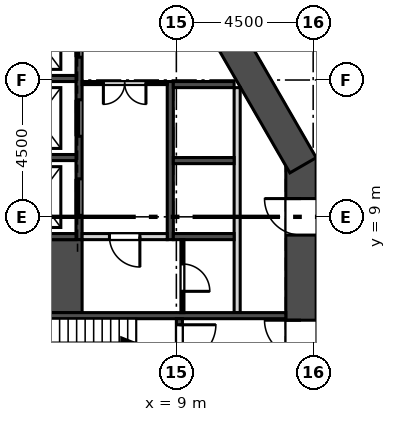
"""IFC4 building model, lengths in metres.
Left out: names, types, materials, properties, quantities, classifications, styles, units other than length and angle.
Written with IfcOpenShell. Run it as: python <this file> out.ifc"""

import sys

from ifc_helpers import new_model, si_unit, direction, frame, frame_2d, origin, place, context, subcontext, project, spatial, rectangle, extrude, element, fill, save


model = new_model("IFC4")
c1 = context("Model", 3, precision=1e-05, world=origin(), true_north=direction((0.0, 1.0)))
c2 = subcontext(c1, "Body", "Model", "MODEL_VIEW")
j1 = project(units=[si_unit("LENGTHUNIT", "METRE"), si_unit("PLANEANGLEUNIT", "RADIAN")], contexts=[c1])
p1 = place(None, origin())
s1 = spatial("IfcSite", under=j1, at=p1, CompositionType="ELEMENT")
p2 = place(p1, origin())
s2 = spatial("IfcBuilding", under=s1, at=p2, CompositionType="ELEMENT")
p3 = place(p2, frame((0.0, 0.0, 218.1)))
s3 = spatial("IfcBuildingStorey", under=s2, at=p3, CompositionType="ELEMENT", Elevation=218.1)
p4 = place(p3, frame((13.1, 1.25, 0.0), z_axis=(0.0, 0.0, 1.0), x_axis=(0.0, 1.0, 0.0)))
e1 = element("IfcWall", 1, at=p4, inside=s3, PredefinedType="SHEAR", context=c2, shape_type="SweptSolid", body=[
    extrude(rectangle(XDim=9.695, YDim=1.0, at=frame_2d((4.848, 0.0))), origin(), (0.0, 0.0, 1.0), 5.4),
])
p5 = place(p4, frame((3.15, 0.0, 0.0)))
e2 = element("IfcOpeningElement", 2, at=p5, cuts=e1, PredefinedType="OPENING", context=c2, shape_type="SweptSolid", body=[
    extrude(rectangle(XDim=1.2, YDim=2.1, at=frame_2d((0.6, 1.05))), frame((0.0, 0.51, 0.0), z_axis=(0.0, -1.0, 0.0), x_axis=(1.0, 0.0, 0.0)), (0.0, 0.0, 1.0), 1.02),
])
p6 = place(p4, frame((7.15, 0.0, 0.0)))
e3 = element("IfcOpeningElement", 3, at=p6, cuts=e1, PredefinedType="OPENING", context=c2, shape_type="SweptSolid", body=[
    extrude(rectangle(XDim=1.2, YDim=2.1, at=frame_2d((0.6, 1.05))), frame((0.0, 0.51, 0.0), z_axis=(0.0, -1.0, 0.0), x_axis=(1.0, 0.0, 0.0)), (0.0, 0.0, 1.0), 1.02),
])
p7 = place(p3, frame((13.167, 10.695, 0.0), z_axis=(0.0, 0.0, 1.0), x_axis=(-0.499995021168, 0.866028278295, 0.0)))
e4 = element("IfcWall", 4, at=p7, inside=s3, PredefinedType="SHEAR", context=c2, shape_type="SweptSolid", body=[
    extrude(rectangle(XDim=8.839, YDim=1.0, at=frame_2d((4.419, 0.0))), origin(), (0.0, 0.0, 1.0), 5.4),
])
p8 = place(p3, frame((27.139, 7.709, 0.0), z_axis=(0.0, 0.0, 1.0), x_axis=(-0.500000533701, 0.866025095652, 0.0)))
e5 = element("IfcWall", 5, at=p8, inside=s3, PredefinedType="SOLIDWALL", context=c2, shape_type="SweptSolid", body=[
    extrude(rectangle(XDim=45.573, YDim=0.34, at=frame_2d((22.787, 0.0))), origin(), (0.0, 0.0, 1.0), 5.0),
])
p9 = place(p8, frame((1.893, 0.0, 0.9)))
e6 = element("IfcOpeningElement", 6, at=p9, cuts=e5, PredefinedType="OPENING", context=c2, shape_type="SweptSolid", body=[
    extrude(rectangle(XDim=1.885, YDim=3.0, at=frame_2d((0.942, 1.5))), frame((0.0, 0.18, 0.0), z_axis=(0.0, -1.0, 0.0), x_axis=(1.0, 0.0, 0.0)), (0.0, 0.0, 1.0), 0.36),
])
p10 = place(p8, frame((4.893, 0.0, 0.9)))
e7 = element("IfcOpeningElement", 7, at=p10, cuts=e5, PredefinedType="OPENING", context=c2, shape_type="SweptSolid", body=[
    extrude(rectangle(XDim=1.885, YDim=3.0, at=frame_2d((0.942, 1.5))), frame((0.0, 0.18, 0.0), z_axis=(0.0, -1.0, 0.0), x_axis=(1.0, 0.0, 0.0)), (0.0, 0.0, 1.0), 0.36),
])
p11 = place(p8, frame((7.893, 0.0, 0.9)))
e8 = element("IfcOpeningElement", 8, at=p11, cuts=e5, PredefinedType="OPENING", context=c2, shape_type="SweptSolid", body=[
    extrude(rectangle(XDim=1.885, YDim=3.0, at=frame_2d((0.942, 1.5))), frame((0.0, 0.18, 0.0), z_axis=(0.0, -1.0, 0.0), x_axis=(1.0, 0.0, 0.0)), (0.0, 0.0, 1.0), 0.36),
])
p12 = place(p8, frame((10.893, 0.0, 0.9)))
e9 = element("IfcOpeningElement", 9, at=p12, cuts=e5, PredefinedType="OPENING", context=c2, shape_type="SweptSolid", body=[
    extrude(rectangle(XDim=1.885, YDim=3.0, at=frame_2d((0.942, 1.5))), frame((0.0, 0.18, 0.0), z_axis=(0.0, -1.0, 0.0), x_axis=(1.0, 0.0, 0.0)), (0.0, 0.0, 1.0), 0.36),
])
p13 = place(p8, frame((13.893, 0.0, 0.9)))
e10 = element("IfcOpeningElement", 10, at=p13, cuts=e5, PredefinedType="OPENING", context=c2, shape_type="SweptSolid", body=[
    extrude(rectangle(XDim=1.885, YDim=3.0, at=frame_2d((0.942, 1.5))), frame((0.0, 0.18, 0.0), z_axis=(0.0, -1.0, 0.0), x_axis=(1.0, 0.0, 0.0)), (0.0, 0.0, 1.0), 0.36),
])
p14 = place(p8, frame((16.893, 0.0, 0.9)))
e11 = element("IfcOpeningElement", 11, at=p14, cuts=e5, PredefinedType="OPENING", context=c2, shape_type="SweptSolid", body=[
    extrude(rectangle(XDim=1.885, YDim=3.0, at=frame_2d((0.942, 1.5))), frame((0.0, 0.18, 0.0), z_axis=(0.0, -1.0, 0.0), x_axis=(1.0, 0.0, 0.0)), (0.0, 0.0, 1.0), 0.36),
])
p15 = place(p8, frame((19.893, 0.0, 0.9)))
e12 = element("IfcOpeningElement", 12, at=p15, cuts=e5, PredefinedType="OPENING", context=c2, shape_type="SweptSolid", body=[
    extrude(rectangle(XDim=1.885, YDim=3.0, at=frame_2d((0.942, 1.5))), frame((0.0, 0.18, 0.0), z_axis=(0.0, -1.0, 0.0), x_axis=(1.0, 0.0, 0.0)), (0.0, 0.0, 1.0), 0.36),
])
p16 = place(p8, frame((22.893, 0.0, 0.9)))
e13 = element("IfcOpeningElement", 13, at=p16, cuts=e5, PredefinedType="OPENING", context=c2, shape_type="SweptSolid", body=[
    extrude(rectangle(XDim=1.885, YDim=3.0, at=frame_2d((0.942, 1.5))), frame((0.0, 0.18, 0.0), z_axis=(0.0, -1.0, 0.0), x_axis=(1.0, 0.0, 0.0)), (0.0, 0.0, 1.0), 0.36),
])
p17 = place(p8, frame((25.893, 0.0, 0.9)))
e14 = element("IfcOpeningElement", 14, at=p17, cuts=e5, PredefinedType="OPENING", context=c2, shape_type="SweptSolid", body=[
    extrude(rectangle(XDim=1.885, YDim=3.0, at=frame_2d((0.942, 1.5))), frame((0.0, 0.18, 0.0), z_axis=(0.0, -1.0, 0.0), x_axis=(1.0, 0.0, 0.0)), (0.0, 0.0, 1.0), 0.36),
])
p18 = place(p8, frame((28.893, 0.0, 0.9)))
e15 = element("IfcOpeningElement", 15, at=p18, cuts=e5, PredefinedType="OPENING", context=c2, shape_type="SweptSolid", body=[
    extrude(rectangle(XDim=1.885, YDim=3.0, at=frame_2d((0.942, 1.5))), frame((0.0, 0.18, 0.0), z_axis=(0.0, -1.0, 0.0), x_axis=(1.0, 0.0, 0.0)), (0.0, 0.0, 1.0), 0.36),
])
p19 = place(p8, frame((31.893, 0.0, 0.9)))
e16 = element("IfcOpeningElement", 16, at=p19, cuts=e5, PredefinedType="OPENING", context=c2, shape_type="SweptSolid", body=[
    extrude(rectangle(XDim=1.885, YDim=3.0, at=frame_2d((0.942, 1.5))), frame((0.0, 0.18, 0.0), z_axis=(0.0, -1.0, 0.0), x_axis=(1.0, 0.0, 0.0)), (0.0, 0.0, 1.0), 0.36),
])
p20 = place(p8, frame((34.893, 0.0, 0.9)))
e17 = element("IfcOpeningElement", 17, at=p20, cuts=e5, PredefinedType="OPENING", context=c2, shape_type="SweptSolid", body=[
    extrude(rectangle(XDim=1.885, YDim=3.0, at=frame_2d((0.942, 1.5))), frame((0.0, 0.18, 0.0), z_axis=(0.0, -1.0, 0.0), x_axis=(1.0, 0.0, 0.0)), (0.0, 0.0, 1.0), 0.36),
])
p21 = place(p8, frame((37.893, 0.0, 0.9)))
e18 = element("IfcOpeningElement", 18, at=p21, cuts=e5, PredefinedType="OPENING", context=c2, shape_type="SweptSolid", body=[
    extrude(rectangle(XDim=1.885, YDim=3.0, at=frame_2d((0.942, 1.5))), frame((0.0, 0.18, 0.0), z_axis=(0.0, -1.0, 0.0), x_axis=(1.0, 0.0, 0.0)), (0.0, 0.0, 1.0), 0.36),
])
p22 = place(p8, frame((40.893, 0.0, 0.9)))
e19 = element("IfcOpeningElement", 19, at=p22, cuts=e5, PredefinedType="OPENING", context=c2, shape_type="SweptSolid", body=[
    extrude(rectangle(XDim=1.885, YDim=3.0, at=frame_2d((0.942, 1.5))), frame((0.0, 0.18, 0.0), z_axis=(0.0, -1.0, 0.0), x_axis=(1.0, 0.0, 0.0)), (0.0, 0.0, 1.0), 0.36),
])
p23 = place(p3, frame((11.0, 5.85, 0.0), z_axis=(0.0, 0.0, 1.0), x_axis=(0.0, 1.0, 0.0)))
e20 = element("IfcWall", 20, at=p23, inside=s3, PredefinedType="SOLIDWALL", context=c2, shape_type="SweptSolid", body=[
    extrude(rectangle(XDim=7.4, YDim=0.2, at=frame_2d((3.7, 0.0))), origin(), (0.0, 0.0, 1.0), 5.0),
])
p24 = place(p3, frame((8.8, 8.25, -0.4), z_axis=(0.0, 0.0, 1.0), x_axis=(0.0, 1.0, 0.0)))
e21 = element("IfcWall", 21, at=p24, inside=s3, PredefinedType="SOLIDWALL", context=c2, shape_type="SweptSolid", body=[
    extrude(rectangle(XDim=5.2, YDim=0.2, at=frame_2d((2.6, 0.0))), origin(), (0.0, 0.0, 1.0), 5.4),
])
p25 = place(p3, frame((5.8, 8.25, -0.4), z_axis=(0.0, 0.0, 1.0), x_axis=(0.0, 1.0, 0.0)))
e22 = element("IfcWall", 22, at=p25, inside=s3, PredefinedType="SOLIDWALL", context=c2, shape_type="SweptSolid", body=[
    extrude(rectangle(XDim=8.0, YDim=0.2, at=frame_2d((4.0, 0.0))), origin(), (0.0, 0.0, 1.0), 5.4),
])
p26 = place(p25, frame((0.8, 0.0, 0.4)))
e23 = element("IfcOpeningElement", 23, at=p26, cuts=e22, PredefinedType="OPENING", context=c2, shape_type="SweptSolid", body=[
    extrude(rectangle(XDim=1.2, YDim=2.1, at=frame_2d((0.6, 1.05))), frame((0.0, 0.11, 0.0), z_axis=(0.0, -1.0, 0.0), x_axis=(1.0, 0.0, 0.0)), (0.0, 0.0, 1.0), 0.22),
])
p27 = place(p25, frame((3.4, 0.0, 0.4)))
e24 = element("IfcOpeningElement", 24, at=p27, cuts=e22, PredefinedType="OPENING", context=c2, shape_type="SweptSolid", body=[
    extrude(rectangle(XDim=1.2, YDim=2.1, at=frame_2d((0.6, 1.05))), frame((0.0, 0.11, 0.0), z_axis=(0.0, -1.0, 0.0), x_axis=(1.0, 0.0, 0.0)), (0.0, 0.0, 1.0), 0.22),
])
p28 = place(p25, frame((6.0, 0.0, 0.4)))
e25 = element("IfcOpeningElement", 25, at=p28, cuts=e22, PredefinedType="OPENING", context=c2, shape_type="SweptSolid", body=[
    extrude(rectangle(XDim=1.2, YDim=2.1, at=frame_2d((0.6, 1.05))), frame((0.0, 0.11, 0.0), z_axis=(0.0, -1.0, 0.0), x_axis=(1.0, 0.0, 0.0)), (0.0, 0.0, 1.0), 0.22),
])
p29 = place(p3, frame((5.2, 5.85, -0.4), z_axis=(0.0, 0.0, 1.0), x_axis=(0.0, 1.0, 0.0)))
e26 = element("IfcWall", 26, at=p29, inside=s3, PredefinedType="SOLIDWALL", context=c2, shape_type="SweptSolid", body=[
    extrude(rectangle(XDim=2.4, YDim=1.4, at=frame_2d((1.2, 0.0))), origin(), (0.0, 0.0, 1.0), 5.4),
])
p30 = place(p3, frame((8.9, 8.35, -0.4), z_axis=(0.0, 0.0, 1.0), x_axis=(1.0, 0.0, 0.0)))
e27 = element("IfcWall", 27, at=p30, inside=s3, PredefinedType="SOLIDWALL", context=c2, shape_type="SweptSolid", body=[
    extrude(rectangle(XDim=2.0, YDim=0.2, at=frame_2d((1.0, 0.0))), origin(), (0.0, 0.0, 1.0), 5.4),
])
p31 = place(p3, frame((1.5, 8.35, -0.4), z_axis=(0.0, 0.0, 1.0), x_axis=(1.0, 0.0, 0.0)))
e28 = element("IfcWall", 28, at=p31, inside=s3, PredefinedType="SOLIDWALL", context=c2, shape_type="SweptSolid", body=[
    extrude(rectangle(XDim=4.2, YDim=0.2, at=frame_2d((2.1, 0.0))), origin(), (0.0, 0.0, 1.0), 5.4),
])
p32 = place(p3, frame((1.2, 5.75, -0.4), z_axis=(0.0, 0.0, 1.0), x_axis=(1.0, 0.0, 0.0)))
e29 = element("IfcWall", 29, at=p32, inside=s3, PredefinedType="SOLIDWALL", context=c2, shape_type="SweptSolid", body=[
    extrude(rectangle(XDim=11.4, YDim=0.2, at=frame_2d((5.7, 0.0))), origin(), (0.0, 0.0, 1.0), 5.4),
])
p33 = place(p3, frame((9.1, 2.25, -0.4), z_axis=(0.0, 0.0, 1.0), x_axis=(0.0, 1.0, 0.0)))
e30 = element("IfcWall", 30, at=p33, inside=s3, PredefinedType="SOLIDWALL", context=c2, shape_type="SweptSolid", body=[
    extrude(rectangle(XDim=3.4, YDim=0.2, at=frame_2d((1.7, 0.0))), origin(), (0.0, 0.0, 1.0), 5.4),
])
p34 = place(p33, frame((0.2, 0.0, 0.4)))
e31 = element("IfcOpeningElement", 31, at=p34, cuts=e30, PredefinedType="OPENING", context=c2, shape_type="SweptSolid", body=[
    extrude(rectangle(XDim=1.2, YDim=2.1, at=frame_2d((0.6, 1.05))), frame((0.0, 0.11, 0.0), z_axis=(0.0, -1.0, 0.0), x_axis=(1.0, 0.0, 0.0)), (0.0, 0.0, 1.0), 0.22),
])
p35 = place(p33, frame((2.0, 0.0, 0.4)))
e32 = element("IfcOpeningElement", 32, at=p35, cuts=e30, PredefinedType="OPENING", context=c2, shape_type="SweptSolid", body=[
    extrude(rectangle(XDim=1.2, YDim=2.1, at=frame_2d((0.6, 1.05))), frame((0.0, 0.11, 0.0), z_axis=(0.0, -1.0, 0.0), x_axis=(1.0, 0.0, 0.0)), (0.0, 0.0, 1.0), 0.22),
])
for number, where, z_axis, x_axis in (
    (33, (8.9, 10.85, -0.4), (0.0, 0.0, 1.0), (1.0, 0.0, 0.0)),
    (34, (8.9, 13.35, -0.4), (0.0, 0.0, 1.0), (1.0, 0.0, 0.0)),
    (35, (3.7, 10.95, -0.4), (0.0, 0.0, 1.0), (1.0, 0.0, 0.0)),
    (36, (3.7, 13.55, -0.4), (0.0, 0.0, 1.0), (1.0, 0.0, 0.0)),
):
    element("IfcWall", number, at=place(p3, frame(where, z_axis=z_axis, x_axis=x_axis)), inside=s3, PredefinedType="SOLIDWALL", context=c2, shape_type="SweptSolid", body=[
        extrude(rectangle(XDim=2.0, YDim=0.2, at=frame_2d((1.0, 0.0))), origin(), (0.0, 0.0, 1.0), 5.4),
    ])
p36 = place(p3, frame((5.9, 13.4, 0.0), z_axis=(0.0, 0.0, 1.0), x_axis=(1.0, 0.0, 0.0)))
e37 = element("IfcWall", 37, at=p36, inside=s3, PredefinedType="PARTITIONING", context=c2, shape_type="SweptSolid", body=[
    extrude(rectangle(XDim=2.8, YDim=0.1, at=frame_2d((1.4, 0.0))), origin(), (0.0, 0.0, 1.0), 5.0),
])
p37 = place(p36, frame((0.7, 0.0, 0.0)))
e38 = element("IfcOpeningElement", 38, at=p37, cuts=e37, PredefinedType="OPENING", context=c2, shape_type="SweptSolid", body=[
    extrude(rectangle(XDim=1.4, YDim=2.1, at=frame_2d((0.7, 1.05))), frame((0.0, 0.06, 0.0), z_axis=(0.0, -1.0, 0.0), x_axis=(1.0, 0.0, 0.0)), (0.0, 0.0, 1.0), 0.12),
])
p38 = place(p3, frame((9.2, 5.85, 0.0), z_axis=(0.0, 0.0, 1.0), x_axis=(0.0, 1.0, 0.0)))
e39 = element("IfcWall", 39, at=p38, inside=s3, PredefinedType="PARTITIONING", context=c2, shape_type="SweptSolid", body=[
    extrude(rectangle(XDim=2.4, YDim=0.1, at=frame_2d((1.2, 0.0))), origin(), (0.0, 0.0, 1.0), 5.0),
])
p39 = place(p38, frame((0.7, 0.0, 0.0)))
e40 = element("IfcOpeningElement", 40, at=p39, cuts=e39, PredefinedType="OPENING", context=c2, shape_type="SweptSolid", body=[
    extrude(rectangle(XDim=0.9, YDim=2.1, at=frame_2d((0.45, 1.05))), frame((0.0, 0.06, 0.0), z_axis=(0.0, -1.0, 0.0), x_axis=(1.0, 0.0, 0.0)), (0.0, 0.0, 1.0), 0.12),
])
p40 = place(p3, frame((5.9, 8.35, 0.0), z_axis=(0.0, 0.0, 1.0), x_axis=(1.0, 0.0, 0.0)))
e41 = element("IfcWall", 41, at=p40, inside=s3, PredefinedType="SOLIDWALL", context=c2, shape_type="SweptSolid", body=[
    extrude(rectangle(XDim=2.8, YDim=0.2, at=frame_2d((1.4, 0.0))), origin(), (0.0, 0.0, 1.0), 5.0),
])
p41 = place(p40, frame((0.9, 0.0, 0.0)))
e42 = element("IfcOpeningElement", 42, at=p41, cuts=e41, PredefinedType="OPENING", context=c2, shape_type="SweptSolid", body=[
    extrude(rectangle(XDim=1.0, YDim=2.1, at=frame_2d((0.5, 1.05))), frame((0.0, 0.11, 0.0), z_axis=(0.0, -1.0, 0.0), x_axis=(1.0, 0.0, 0.0)), (0.0, 0.0, 1.0), 0.22),
])
p42 = place(p3, frame((11.621, 22.474, 0.0), z_axis=(0.0, 0.0, 1.0), x_axis=(0.499991059272, -0.866030565655, 0.0)))
e43 = element("IfcWall", 43, at=p42, inside=s3, PredefinedType="SOLIDWALL", context=c2, shape_type="SweptSolid", body=[
    extrude(rectangle(XDim=11.854, YDim=0.3, at=frame_2d((5.927, 0.0))), origin(), (0.0, 0.0, 1.0), 5.0),
])
p43 = place(p26, origin())
e44 = element("IfcDoor", 44, at=p43, inside=s3, OperationType="SLIDING_TO_LEFT", PredefinedType="DOOR", context=c2, shape_type="SweptSolid", body=[
    extrude(rectangle(XDim=1.2, YDim=2.1, at=frame_2d((0.6, 1.05))), frame((0.0, 0.025, 0.0), z_axis=(0.0, -1.0, 0.0), x_axis=(1.0, 0.0, 0.0)), (0.0, 0.0, 1.0), 0.05),
])
fill(e23, e44)
p44 = place(p27, origin())
e45 = element("IfcDoor", 45, at=p44, inside=s3, OperationType="SLIDING_TO_LEFT", PredefinedType="DOOR", context=c2, shape_type="SweptSolid", body=[
    extrude(rectangle(XDim=1.2, YDim=2.1, at=frame_2d((0.6, 1.05))), frame((0.0, 0.025, 0.0), z_axis=(0.0, -1.0, 0.0), x_axis=(1.0, 0.0, 0.0)), (0.0, 0.0, 1.0), 0.05),
])
fill(e24, e45)
p45 = place(p28, origin())
e46 = element("IfcDoor", 46, at=p45, inside=s3, OperationType="SLIDING_TO_LEFT", PredefinedType="DOOR", context=c2, shape_type="SweptSolid", body=[
    extrude(rectangle(XDim=1.2, YDim=2.1, at=frame_2d((0.6, 1.05))), frame((0.0, 0.025, 0.0), z_axis=(0.0, -1.0, 0.0), x_axis=(1.0, 0.0, 0.0)), (0.0, 0.0, 1.0), 0.05),
])
fill(e25, e46)
p46 = place(p37, frame((1.4, 0.0, 0.0), z_axis=(0.0, 0.0, 1.0), x_axis=(-1.0, 0.0, 0.0)))
e47 = element("IfcDoor", 47, at=p46, inside=s3, OperationType="DOUBLE_DOOR_SINGLE_SWING", PredefinedType="DOOR", context=c2, shape_type="SweptSolid", body=[
    extrude(rectangle(XDim=1.4, YDim=2.1, at=frame_2d((0.7, 1.05))), frame((0.0, 0.025, 0.0), z_axis=(0.0, -1.0, 0.0), x_axis=(1.0, 0.0, 0.0)), (0.0, 0.0, 1.0), 0.05),
])
fill(e38, e47)
p47 = place(p41, frame((1.0, 0.0, 0.0), z_axis=(0.0, 0.0, 1.0), x_axis=(-1.0, 0.0, 0.0)))
e48 = element("IfcDoor", 48, at=p47, inside=s3, OperationType="SINGLE_SWING_LEFT", PredefinedType="DOOR", context=c2, shape_type="SweptSolid", body=[
    extrude(rectangle(XDim=1.0, YDim=2.1, at=frame_2d((0.5, 1.05))), frame((0.0, 0.025, 0.0), z_axis=(0.0, -1.0, 0.0), x_axis=(1.0, 0.0, 0.0)), (0.0, 0.0, 1.0), 0.05),
])
fill(e42, e48)
p48 = place(p39, frame((0.9, 0.0, 0.0), z_axis=(0.0, 0.0, 1.0), x_axis=(-1.0, 0.0, 0.0)))
e49 = element("IfcDoor", 49, at=p48, inside=s3, OperationType="SINGLE_SWING_RIGHT", PredefinedType="DOOR", context=c2, shape_type="SweptSolid", body=[
    extrude(rectangle(XDim=0.9, YDim=2.1, at=frame_2d((0.45, 1.05))), frame((0.0, 0.025, 0.0), z_axis=(0.0, -1.0, 0.0), x_axis=(1.0, 0.0, 0.0)), (0.0, 0.0, 1.0), 0.05),
])
fill(e40, e49)
p49 = place(p5, origin())
e50 = element("IfcDoor", 50, at=p49, inside=s3, OperationType="SINGLE_SWING_RIGHT", PredefinedType="DOOR", context=c2, shape_type="SweptSolid", body=[
    extrude(rectangle(XDim=1.2, YDim=2.1, at=frame_2d((0.6, 1.05))), frame((0.0, 0.025, 0.0), z_axis=(0.0, -1.0, 0.0), x_axis=(1.0, 0.0, 0.0)), (0.0, 0.0, 1.0), 0.05),
])
fill(e2, e50)
p50 = place(p6, origin())
e51 = element("IfcDoor", 51, at=p50, inside=s3, OperationType="SINGLE_SWING_RIGHT", PredefinedType="DOOR", context=c2, shape_type="SweptSolid", body=[
    extrude(rectangle(XDim=1.2, YDim=2.1, at=frame_2d((0.6, 1.05))), frame((0.0, 0.025, 0.0), z_axis=(0.0, -1.0, 0.0), x_axis=(1.0, 0.0, 0.0)), (0.0, 0.0, 1.0), 0.05),
])
fill(e3, e51)
p51 = place(p35, frame((1.2, 0.0, 0.0), z_axis=(0.0, 0.0, 1.0), x_axis=(-1.0, 0.0, 0.0)))
e52 = element("IfcDoor", 52, at=p51, inside=s3, OperationType="SINGLE_SWING_LEFT", PredefinedType="DOOR", context=c2, shape_type="SweptSolid", body=[
    extrude(rectangle(XDim=1.2, YDim=2.1, at=frame_2d((0.6, 1.05))), frame((0.0, 0.025, 0.0), z_axis=(0.0, -1.0, 0.0), x_axis=(1.0, 0.0, 0.0)), (0.0, 0.0, 1.0), 0.05),
])
fill(e32, e52)
save(model, sys.argv[1])
